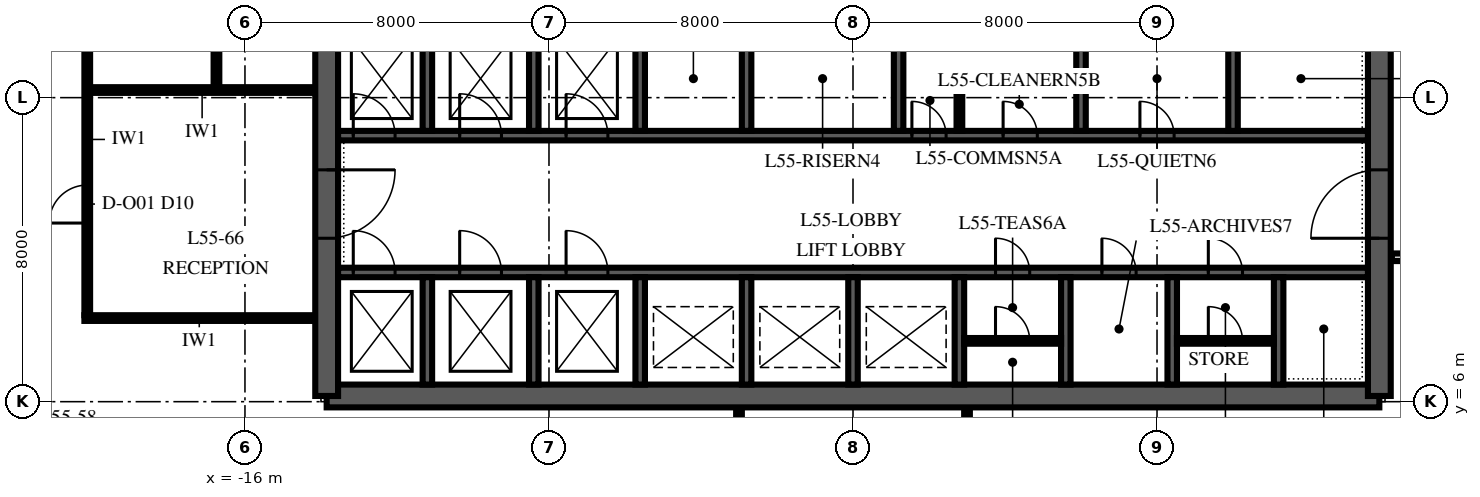
"""IFC4 building model, lengths in metres.
Left out: names, types, materials, properties, quantities, classifications, styles, units other than length and angle.
Written with IfcOpenShell. Run it as: python <this file> out.ifc"""

import sys

from ifc_helpers import new_model, si_unit, direction, frame, frame_2d, origin, place, context, subcontext, project, spatial, polyline, rectangle, outline, extrude, element, fill, save


model = new_model("IFC4")
c1 = context("Model", 3, precision=1e-05, world=origin(), true_north=direction((0.0, 1.0)))
c2 = subcontext(c1, "Body", "Model", "MODEL_VIEW")
j1 = project(units=[si_unit("LENGTHUNIT", "METRE"), si_unit("PLANEANGLEUNIT", "RADIAN")], contexts=[c1])
p1 = place(None, origin())
s1 = spatial("IfcSite", under=j1, at=p1, CompositionType="ELEMENT")
p2 = place(p1, origin())
s2 = spatial("IfcBuilding", under=s1, at=p2, CompositionType="ELEMENT")
p3 = place(p2, frame((0.0, 0.0, 238.0)))
s3 = spatial("IfcBuildingStorey", under=s2, at=p3, CompositionType="ELEMENT", Elevation=238.0)
p4 = place(p3, frame((-13.85, 6.15, 0.0), z_axis=(0.0, 0.0, 1.0), x_axis=(1.0, 0.0, 0.0)))
e1 = element("IfcWall", 1, at=p4, inside=s3, PredefinedType="SHEAR", context=c2, shape_type="SweptSolid", body=[
    extrude(rectangle(XDim=27.7, YDim=0.6, at=frame_2d((13.85, 0.0))), origin(), (0.0, 0.0, 1.0), 4.0),
])
p5 = place(p3, frame((13.85, 6.15, 0.0), z_axis=(0.0, 0.0, 1.0), x_axis=(0.0, 1.0, 0.0)))
e2 = element("IfcWall", 2, at=p5, inside=s3, PredefinedType="SHEAR", context=c2, shape_type="SweptSolid", body=[
    extrude(outline(polyline([(0.0, -0.3), (17.7, -0.3), (17.7, 0.0), (17.4, 0.0), (17.4, 0.3), (0.3, 0.3), (0.3, 0.0), (0.0, 0.0), (0.0, -0.3)])), origin(), (0.0, 0.0, 1.0), 4.0),
])
p6 = place(p5, frame((4.15, 0.0, 0.0)))
e3 = element("IfcOpeningElement", 3, at=p6, cuts=e2, PredefinedType="OPENING", context=c2, shape_type="SweptSolid", body=[
    extrude(rectangle(XDim=1.8, YDim=2.4, at=frame_2d((0.9, 1.2))), frame((0.0, 0.315, 0.0), z_axis=(0.0, -1.0, 0.0), x_axis=(1.0, 0.0, 0.0)), (0.0, 0.0, 1.0), 0.63),
])
p7 = place(p3, frame((-13.85, 23.85, 0.0), z_axis=(0.0, 0.0, 1.0), x_axis=(0.0, -1.0, 0.0)))
e4 = element("IfcWall", 4, at=p7, inside=s3, PredefinedType="SHEAR", context=c2, shape_type="SweptSolid", body=[
    extrude(outline(polyline([(0.0, -0.3), (17.7, -0.3), (17.7, 0.0), (17.4, 0.0), (17.4, 0.3), (0.3, 0.3), (0.3, 0.0), (0.0, 0.0), (0.0, -0.3)])), origin(), (0.0, 0.0, 1.0), 4.0),
])
p8 = place(p7, frame((11.75, 0.0, 0.0)))
e5 = element("IfcOpeningElement", 5, at=p8, cuts=e4, PredefinedType="OPENING", context=c2, shape_type="SweptSolid", body=[
    extrude(rectangle(XDim=1.8, YDim=2.4, at=frame_2d((0.9, 1.2))), frame((0.0, 0.315, 0.0), z_axis=(0.0, -1.0, 0.0), x_axis=(1.0, 0.0, 0.0)), (0.0, 0.0, 1.0), 0.63),
])
p9 = place(p3, frame((-13.55, 9.4, 0.0), z_axis=(0.0, 0.0, 1.0), x_axis=(1.0, 0.0, 0.0)))
e6 = element("IfcWall", 6, at=p9, inside=s3, PredefinedType="SHEAR", context=c2, shape_type="SweptSolid", body=[
    extrude(rectangle(XDim=27.1, YDim=0.25, at=frame_2d((13.55, 0.0))), origin(), (0.0, 0.0, 1.0), 4.0),
])
p10 = place(p9, frame((0.4, 0.0, 0.0)))
e7 = element("IfcOpeningElement", 7, at=p10, cuts=e6, PredefinedType="OPENING", context=c2, shape_type="SweptSolid", body=[
    extrude(rectangle(XDim=1.1, YDim=2.1, at=frame_2d((0.55, 1.05))), frame((0.0, 0.14, 0.0), z_axis=(0.0, -1.0, 0.0), x_axis=(1.0, 0.0, 0.0)), (0.0, 0.0, 1.0), 0.28),
])
p11 = place(p9, frame((3.2, 0.0, 0.0)))
e8 = element("IfcOpeningElement", 8, at=p11, cuts=e6, PredefinedType="OPENING", context=c2, shape_type="SweptSolid", body=[
    extrude(rectangle(XDim=1.1, YDim=2.1, at=frame_2d((0.55, 1.05))), frame((0.0, 0.14, 0.0), z_axis=(0.0, -1.0, 0.0), x_axis=(1.0, 0.0, 0.0)), (0.0, 0.0, 1.0), 0.28),
])
p12 = place(p9, frame((6.0, 0.0, 0.0)))
e9 = element("IfcOpeningElement", 9, at=p12, cuts=e6, PredefinedType="OPENING", context=c2, shape_type="SweptSolid", body=[
    extrude(rectangle(XDim=1.1, YDim=2.1, at=frame_2d((0.55, 1.05))), frame((0.0, 0.14, 0.0), z_axis=(0.0, -1.0, 0.0), x_axis=(1.0, 0.0, 0.0)), (0.0, 0.0, 1.0), 0.28),
])
p13 = place(p9, frame((17.3, 0.0, 0.0)))
e10 = element("IfcOpeningElement", 10, at=p13, cuts=e6, PredefinedType="OPENING", context=c2, shape_type="SweptSolid", body=[
    extrude(rectangle(XDim=0.9, YDim=2.1, at=frame_2d((0.45, 1.05))), frame((0.0, 0.14, 0.0), z_axis=(0.0, -1.0, 0.0), x_axis=(1.0, 0.0, 0.0)), (0.0, 0.0, 1.0), 0.28),
])
p14 = place(p9, frame((20.1, 0.0, 0.0)))
e11 = element("IfcOpeningElement", 11, at=p14, cuts=e6, PredefinedType="OPENING", context=c2, shape_type="SweptSolid", body=[
    extrude(rectangle(XDim=0.9, YDim=2.1, at=frame_2d((0.45, 1.05))), frame((0.0, 0.14, 0.0), z_axis=(0.0, -1.0, 0.0), x_axis=(1.0, 0.0, 0.0)), (0.0, 0.0, 1.0), 0.28),
])
p15 = place(p9, frame((22.9, 0.0, 0.0)))
e12 = element("IfcOpeningElement", 12, at=p15, cuts=e6, PredefinedType="OPENING", context=c2, shape_type="SweptSolid", body=[
    extrude(rectangle(XDim=0.9, YDim=2.1, at=frame_2d((0.45, 1.05))), frame((0.0, 0.14, 0.0), z_axis=(0.0, -1.0, 0.0), x_axis=(1.0, 0.0, 0.0)), (0.0, 0.0, 1.0), 0.28),
])
p16 = place(p3, frame((-13.55, 13.0, 0.0), z_axis=(0.0, 0.0, 1.0), x_axis=(1.0, 0.0, 0.0)))
e13 = element("IfcWall", 13, at=p16, inside=s3, PredefinedType="SHEAR", context=c2, shape_type="SweptSolid", body=[
    extrude(rectangle(XDim=27.1, YDim=0.25, at=frame_2d((13.55, 0.0))), origin(), (0.0, 0.0, 1.0), 4.0),
])
p17 = place(p16, frame((0.4, 0.0, 0.0)))
e14 = element("IfcOpeningElement", 14, at=p17, cuts=e13, PredefinedType="OPENING", context=c2, shape_type="SweptSolid", body=[
    extrude(rectangle(XDim=1.1, YDim=2.1, at=frame_2d((0.55, 1.05))), frame((0.0, 0.14, 0.0), z_axis=(0.0, -1.0, 0.0), x_axis=(1.0, 0.0, 0.0)), (0.0, 0.0, 1.0), 0.28),
])
p18 = place(p16, frame((3.2, 0.0, 0.0)))
e15 = element("IfcOpeningElement", 15, at=p18, cuts=e13, PredefinedType="OPENING", context=c2, shape_type="SweptSolid", body=[
    extrude(rectangle(XDim=1.1, YDim=2.1, at=frame_2d((0.55, 1.05))), frame((0.0, 0.14, 0.0), z_axis=(0.0, -1.0, 0.0), x_axis=(1.0, 0.0, 0.0)), (0.0, 0.0, 1.0), 0.28),
])
p19 = place(p16, frame((6.0, 0.0, 0.0)))
e16 = element("IfcOpeningElement", 16, at=p19, cuts=e13, PredefinedType="OPENING", context=c2, shape_type="SweptSolid", body=[
    extrude(rectangle(XDim=1.1, YDim=2.1, at=frame_2d((0.55, 1.05))), frame((0.0, 0.14, 0.0), z_axis=(0.0, -1.0, 0.0), x_axis=(1.0, 0.0, 0.0)), (0.0, 0.0, 1.0), 0.28),
])
p20 = place(p16, frame((15.1, 0.0, 0.0)))
e17 = element("IfcOpeningElement", 17, at=p20, cuts=e13, PredefinedType="OPENING", context=c2, shape_type="SweptSolid", body=[
    extrude(rectangle(XDim=0.9, YDim=2.1, at=frame_2d((0.45, 1.05))), frame((0.0, 0.14, 0.0), z_axis=(0.0, -1.0, 0.0), x_axis=(1.0, 0.0, 0.0)), (0.0, 0.0, 1.0), 0.28),
])
p21 = place(p16, frame((17.5, 0.0, 0.0)))
e18 = element("IfcOpeningElement", 18, at=p21, cuts=e13, PredefinedType="OPENING", context=c2, shape_type="SweptSolid", body=[
    extrude(rectangle(XDim=0.9, YDim=2.1, at=frame_2d((0.45, 1.05))), frame((0.0, 0.14, 0.0), z_axis=(0.0, -1.0, 0.0), x_axis=(1.0, 0.0, 0.0)), (0.0, 0.0, 1.0), 0.28),
])
p22 = place(p16, frame((21.1, 0.0, 0.0)))
e19 = element("IfcOpeningElement", 19, at=p22, cuts=e13, PredefinedType="OPENING", context=c2, shape_type="SweptSolid", body=[
    extrude(rectangle(XDim=0.9, YDim=2.1, at=frame_2d((0.45, 1.05))), frame((0.0, 0.14, 0.0), z_axis=(0.0, -1.0, 0.0), x_axis=(1.0, 0.0, 0.0)), (0.0, 0.0, 1.0), 0.28),
])
for number, where, z_axis, x_axis in (
    (20, (-11.2, 6.45, 0.0), (0.0, 0.0, 1.0), (0.0, 1.0, 0.0)),
    (21, (-8.4, 6.45, 0.0), (0.0, 0.0, 1.0), (0.0, 1.0, 0.0)),
    (22, (-5.6, 6.45, 0.0), (0.0, 0.0, 1.0), (0.0, 1.0, 0.0)),
    (23, (-2.8, 6.45, 0.0), (0.0, 0.0, 1.0), (0.0, 1.0, 0.0)),
    (24, (0.0, 6.45, 0.0), (0.0, 0.0, 1.0), (0.0, 1.0, 0.0)),
    (25, (2.8, 6.45, 0.0), (0.0, 0.0, 1.0), (0.0, 1.0, 0.0)),
    (26, (5.6, 6.45, 0.0), (0.0, 0.0, 1.0), (0.0, 1.0, 0.0)),
    (27, (8.4, 6.45, 0.0), (0.0, 0.0, 1.0), (0.0, 1.0, 0.0)),
    (28, (11.2, 6.45, 0.0), (0.0, 0.0, 1.0), (0.0, 1.0, 0.0)),
):
    element("IfcWall", number, at=place(p3, frame(where, z_axis=z_axis, x_axis=x_axis)), inside=s3, PredefinedType="SHEAR", context=c2, shape_type="SweptSolid", body=[
        extrude(rectangle(XDim=2.825, YDim=0.25, at=frame_2d((1.413, 0.0))), origin(), (0.0, 0.0, 1.0), 4.0),
    ])
for number, where, z_axis, x_axis in (
    (29, (-11.2, 13.125, 0.0), (0.0, 0.0, 1.0), (0.0, 1.0, 0.0)),
    (30, (-8.4, 13.125, 0.0), (0.0, 0.0, 1.0), (0.0, 1.0, 0.0)),
    (31, (-5.6, 13.125, 0.0), (0.0, 0.0, 1.0), (0.0, 1.0, 0.0)),
    (32, (-2.8, 13.125, 0.0), (0.0, 0.0, 1.0), (0.0, 1.0, 0.0)),
    (33, (1.2, 13.125, 0.0), (0.0, 0.0, 1.0), (0.0, 1.0, 0.0)),
    (34, (6.0, 13.125, 0.0), (0.0, 0.0, 1.0), (0.0, 1.0, 0.0)),
    (35, (10.0, 13.125, 0.0), (0.0, 0.0, 1.0), (0.0, 1.0, 0.0)),
):
    element("IfcWall", number, at=place(p3, frame(where, z_axis=z_axis, x_axis=x_axis)), inside=s3, PredefinedType="SHEAR", context=c2, shape_type="SweptSolid", body=[
        extrude(rectangle(XDim=2.75, YDim=0.25, at=frame_2d((1.375, 0.0))), origin(), (0.0, 0.0, 1.0), 4.0),
    ])
p23 = place(p3, frame((2.8, 13.125, 0.0), z_axis=(0.0, 0.0, 1.0), x_axis=(0.0, 1.0, 0.0)))
e36 = element("IfcWall", 36, at=p23, inside=s3, PredefinedType="PARTITIONING", context=c2, shape_type="SweptSolid", body=[
    extrude(rectangle(XDim=1.55, YDim=0.15, at=frame_2d((0.775, 0.0))), origin(), (0.0, 0.0, 1.0), 3.85),
])
p24 = place(p3, frame((2.875, 14.6, 0.0), z_axis=(0.0, 0.0, 1.0), x_axis=(1.0, 0.0, 0.0)))
e37 = element("IfcWall", 37, at=p24, inside=s3, PredefinedType="PARTITIONING", context=c2, shape_type="SweptSolid", body=[
    extrude(rectangle(XDim=3.0, YDim=0.15, at=frame_2d((1.5, 0.0))), origin(), (0.0, 0.0, 1.0), 3.85),
])
p25 = place(p3, frame((2.925, 7.6, 0.0), z_axis=(0.0, 0.0, 1.0), x_axis=(1.0, 0.0, 0.0)))
e38 = element("IfcWall", 38, at=p25, inside=s3, PredefinedType="PARTITIONING", context=c2, shape_type="SweptSolid", body=[
    extrude(rectangle(XDim=2.55, YDim=0.15, at=frame_2d((1.275, 0.0))), origin(), (0.0, 0.0, 1.0), 3.85),
])
p26 = place(p25, frame((0.825, 0.0, 0.0)))
e39 = element("IfcOpeningElement", 39, at=p26, cuts=e38, PredefinedType="OPENING", context=c2, shape_type="SweptSolid", body=[
    extrude(rectangle(XDim=0.9, YDim=2.1, at=frame_2d((0.45, 1.05))), frame((0.0, 0.09, 0.0), z_axis=(0.0, -1.0, 0.0), x_axis=(1.0, 0.0, 0.0)), (0.0, 0.0, 1.0), 0.18),
])
p27 = place(p3, frame((8.525, 7.6, 0.0), z_axis=(0.0, 0.0, 1.0), x_axis=(1.0, 0.0, 0.0)))
e40 = element("IfcWall", 40, at=p27, inside=s3, PredefinedType="PARTITIONING", context=c2, shape_type="SweptSolid", body=[
    extrude(rectangle(XDim=2.55, YDim=0.15, at=frame_2d((1.275, 0.0))), origin(), (0.0, 0.0, 1.0), 3.85),
])
p28 = place(p27, frame((0.825, 0.0, 0.0)))
e41 = element("IfcOpeningElement", 41, at=p28, cuts=e40, PredefinedType="OPENING", context=c2, shape_type="SweptSolid", body=[
    extrude(rectangle(XDim=0.9, YDim=2.1, at=frame_2d((0.45, 1.05))), frame((0.0, 0.09, 0.0), z_axis=(0.0, -1.0, 0.0), x_axis=(1.0, 0.0, 0.0)), (0.0, 0.0, 1.0), 0.18),
])
p29 = place(p3, frame((-20.225, 8.2, 0.0), z_axis=(0.0, 0.0, 1.0), x_axis=(1.0, 0.0, 0.0)))
e42 = element("IfcWall", 42, at=p29, inside=s3, PredefinedType="PARTITIONING", context=c2, shape_type="SweptSolid", body=[
    extrude(rectangle(XDim=6.045, YDim=0.15, at=frame_2d((3.022, 0.0))), origin(), (0.0, 0.0, 1.0), 3.75),
])
p30 = place(p3, frame((14.18, 9.8, 0.0), z_axis=(0.0, 0.0, 1.0), x_axis=(1.0, 0.0, 0.0)))
e43 = element("IfcWall", 43, at=p30, inside=s3, PredefinedType="PARTITIONING", context=c2, shape_type="SweptSolid", body=[
    extrude(rectangle(XDim=2.02, YDim=0.2, at=frame_2d((1.01, 0.0))), origin(), (0.0, 0.0, 1.0), 3.75),
])
p31 = place(p3, frame((-20.075, 14.2, 0.0), z_axis=(0.0, 0.0, 1.0), x_axis=(1.0, 0.0, 0.0)))
e44 = element("IfcWall", 44, at=p31, inside=s3, PredefinedType="PARTITIONING", context=c2, shape_type="SweptSolid", body=[
    extrude(rectangle(XDim=5.895, YDim=0.15, at=frame_2d((2.948, 0.0))), origin(), (0.0, 0.0, 1.0), 3.13),
])
p32 = place(p3, frame((-20.15, 8.275, 0.0), z_axis=(0.0, 0.0, 1.0), x_axis=(0.0, 1.0, 0.0)))
e45 = element("IfcWall", 45, at=p32, inside=s3, PredefinedType="PARTITIONING", context=c2, shape_type="SweptSolid", body=[
    extrude(rectangle(XDim=9.25, YDim=0.15, at=frame_2d((4.625, 0.0))), origin(), (0.0, 0.0, 1.0), 3.13),
])
p33 = place(p32, frame((2.425, 0.0, 0.0)))
e46 = element("IfcOpeningElement", 46, at=p33, cuts=e45, PredefinedType="OPENING", context=c2, shape_type="SweptSolid", body=[
    extrude(rectangle(XDim=1.0, YDim=2.3, at=frame_2d((0.5, 1.15))), frame((0.0, 0.09, 0.0), z_axis=(0.0, -1.0, 0.0), x_axis=(1.0, 0.0, 0.0)), (0.0, 0.0, 1.0), 0.18),
])
p34 = place(p32, frame((7.125, 0.0, 0.0)))
e47 = element("IfcOpeningElement", 47, at=p34, cuts=e45, PredefinedType="OPENING", context=c2, shape_type="SweptSolid", body=[
    extrude(rectangle(XDim=1.0, YDim=2.3, at=frame_2d((0.5, 1.15))), frame((0.0, 0.09, 0.0), z_axis=(0.0, -1.0, 0.0), x_axis=(1.0, 0.0, 0.0)), (0.0, 0.0, 1.0), 0.18),
])
p35 = place(p3, frame((-16.75, 14.275, 0.0), z_axis=(0.0, 0.0, 1.0), x_axis=(0.0, 1.0, 0.0)))
e48 = element("IfcWall", 48, at=p35, inside=s3, PredefinedType="PARTITIONING", context=c2, shape_type="SweptSolid", body=[
    extrude(rectangle(XDim=3.25, YDim=0.15, at=frame_2d((1.625, 0.0))), origin(), (0.0, 0.0, 1.0), 3.13),
])
for number, where, z_axis, x_axis in (
    (49, (-3.0, 1.675, 0.0), (0.0, 0.0, 1.0), (0.0, 1.0, 0.0)),
    (50, (3.0, 1.675, 0.0), (0.0, 0.0, 1.0), (0.0, 1.0, 0.0)),
):
    element("IfcWall", number, at=place(p3, frame(where, z_axis=z_axis, x_axis=x_axis)), inside=s3, PredefinedType="PARTITIONING", context=c2, shape_type="SweptSolid", body=[
        extrude(rectangle(XDim=4.145, YDim=0.15, at=frame_2d((2.073, 0.0))), origin(), (0.0, 0.0, 1.0), 3.75),
    ])
p36 = place(p6, origin())
e51 = element("IfcDoor", 51, at=p36, inside=s3, OperationType="DOUBLE_DOOR_SINGLE_SWING", PredefinedType="DOOR", context=c2, shape_type="SweptSolid", body=[
    extrude(rectangle(XDim=1.8, YDim=2.4, at=frame_2d((0.9, 1.2))), frame((0.0, 0.3, 0.0), z_axis=(0.0, -1.0, 0.0), x_axis=(1.0, 0.0, 0.0)), (0.0, 0.0, 1.0), 0.6),
])
fill(e3, e51)
p37 = place(p8, origin())
e52 = element("IfcDoor", 52, at=p37, inside=s3, OperationType="DOUBLE_DOOR_SINGLE_SWING", PredefinedType="DOOR", context=c2, shape_type="SweptSolid", body=[
    extrude(rectangle(XDim=1.8, YDim=2.4, at=frame_2d((0.9, 1.2))), frame((0.0, 0.3, 0.0), z_axis=(0.0, -1.0, 0.0), x_axis=(1.0, 0.0, 0.0)), (0.0, 0.0, 1.0), 0.6),
])
fill(e5, e52)
p38 = place(p10, origin())
e53 = element("IfcDoor", 53, at=p38, inside=s3, OperationType="SLIDING_TO_LEFT", PredefinedType="DOOR", context=c2, shape_type="SweptSolid", body=[
    extrude(rectangle(XDim=1.1, YDim=2.1, at=frame_2d((0.55, 1.05))), frame((0.0, 0.125, 0.0), z_axis=(0.0, -1.0, 0.0), x_axis=(1.0, 0.0, 0.0)), (0.0, 0.0, 1.0), 0.25),
])
fill(e7, e53)
p39 = place(p11, origin())
e54 = element("IfcDoor", 54, at=p39, inside=s3, OperationType="SLIDING_TO_LEFT", PredefinedType="DOOR", context=c2, shape_type="SweptSolid", body=[
    extrude(rectangle(XDim=1.1, YDim=2.1, at=frame_2d((0.55, 1.05))), frame((0.0, 0.125, 0.0), z_axis=(0.0, -1.0, 0.0), x_axis=(1.0, 0.0, 0.0)), (0.0, 0.0, 1.0), 0.25),
])
fill(e8, e54)
p40 = place(p12, origin())
e55 = element("IfcDoor", 55, at=p40, inside=s3, OperationType="SLIDING_TO_LEFT", PredefinedType="DOOR", context=c2, shape_type="SweptSolid", body=[
    extrude(rectangle(XDim=1.1, YDim=2.1, at=frame_2d((0.55, 1.05))), frame((0.0, 0.125, 0.0), z_axis=(0.0, -1.0, 0.0), x_axis=(1.0, 0.0, 0.0)), (0.0, 0.0, 1.0), 0.25),
])
fill(e9, e55)
p41 = place(p17, origin())
e56 = element("IfcDoor", 56, at=p41, inside=s3, OperationType="SLIDING_TO_LEFT", PredefinedType="DOOR", context=c2, shape_type="SweptSolid", body=[
    extrude(rectangle(XDim=1.1, YDim=2.1, at=frame_2d((0.55, 1.05))), frame((0.0, 0.125, 0.0), z_axis=(0.0, -1.0, 0.0), x_axis=(1.0, 0.0, 0.0)), (0.0, 0.0, 1.0), 0.25),
])
fill(e14, e56)
p42 = place(p18, origin())
e57 = element("IfcDoor", 57, at=p42, inside=s3, OperationType="SLIDING_TO_LEFT", PredefinedType="DOOR", context=c2, shape_type="SweptSolid", body=[
    extrude(rectangle(XDim=1.1, YDim=2.1, at=frame_2d((0.55, 1.05))), frame((0.0, 0.125, 0.0), z_axis=(0.0, -1.0, 0.0), x_axis=(1.0, 0.0, 0.0)), (0.0, 0.0, 1.0), 0.25),
])
fill(e15, e57)
p43 = place(p19, origin())
e58 = element("IfcDoor", 58, at=p43, inside=s3, OperationType="SLIDING_TO_LEFT", PredefinedType="DOOR", context=c2, shape_type="SweptSolid", body=[
    extrude(rectangle(XDim=1.1, YDim=2.1, at=frame_2d((0.55, 1.05))), frame((0.0, 0.125, 0.0), z_axis=(0.0, -1.0, 0.0), x_axis=(1.0, 0.0, 0.0)), (0.0, 0.0, 1.0), 0.25),
])
fill(e16, e58)
p44 = place(p20, origin())
e59 = element("IfcDoor", 59, at=p44, inside=s3, OperationType="SINGLE_SWING_LEFT", PredefinedType="DOOR", context=c2, shape_type="SweptSolid", body=[
    extrude(rectangle(XDim=0.9, YDim=2.1, at=frame_2d((0.45, 1.05))), frame((0.0, 0.125, 0.0), z_axis=(0.0, -1.0, 0.0), x_axis=(1.0, 0.0, 0.0)), (0.0, 0.0, 1.0), 0.25),
])
fill(e17, e59)
p45 = place(p21, origin())
e60 = element("IfcDoor", 60, at=p45, inside=s3, OperationType="SINGLE_SWING_LEFT", PredefinedType="DOOR", context=c2, shape_type="SweptSolid", body=[
    extrude(rectangle(XDim=0.9, YDim=2.1, at=frame_2d((0.45, 1.05))), frame((0.0, 0.125, 0.0), z_axis=(0.0, -1.0, 0.0), x_axis=(1.0, 0.0, 0.0)), (0.0, 0.0, 1.0), 0.25),
])
fill(e18, e60)
p46 = place(p22, origin())
e61 = element("IfcDoor", 61, at=p46, inside=s3, OperationType="SINGLE_SWING_LEFT", PredefinedType="DOOR", context=c2, shape_type="SweptSolid", body=[
    extrude(rectangle(XDim=0.9, YDim=2.1, at=frame_2d((0.45, 1.05))), frame((0.0, 0.125, 0.0), z_axis=(0.0, -1.0, 0.0), x_axis=(1.0, 0.0, 0.0)), (0.0, 0.0, 1.0), 0.25),
])
fill(e19, e61)
p47 = place(p13, origin())
e62 = element("IfcDoor", 62, at=p47, inside=s3, OperationType="SINGLE_SWING_LEFT", PredefinedType="DOOR", context=c2, shape_type="SweptSolid", body=[
    extrude(rectangle(XDim=0.9, YDim=2.1, at=frame_2d((0.45, 1.05))), frame((0.0, 0.125, 0.0), z_axis=(0.0, -1.0, 0.0), x_axis=(1.0, 0.0, 0.0)), (0.0, 0.0, 1.0), 0.25),
])
fill(e10, e62)
p48 = place(p26, origin())
e63 = element("IfcDoor", 63, at=p48, inside=s3, OperationType="SINGLE_SWING_LEFT", PredefinedType="DOOR", context=c2, shape_type="SweptSolid", body=[
    extrude(rectangle(XDim=0.9, YDim=2.1, at=frame_2d((0.45, 1.05))), frame((0.0, 0.075, 0.0), z_axis=(0.0, -1.0, 0.0), x_axis=(1.0, 0.0, 0.0)), (0.0, 0.0, 1.0), 0.149),
])
fill(e39, e63)
p49 = place(p14, origin())
e64 = element("IfcDoor", 64, at=p49, inside=s3, OperationType="SINGLE_SWING_LEFT", PredefinedType="DOOR", context=c2, shape_type="SweptSolid", body=[
    extrude(rectangle(XDim=0.9, YDim=2.1, at=frame_2d((0.45, 1.05))), frame((0.0, 0.125, 0.0), z_axis=(0.0, -1.0, 0.0), x_axis=(1.0, 0.0, 0.0)), (0.0, 0.0, 1.0), 0.25),
])
fill(e11, e64)
p50 = place(p15, origin())
e65 = element("IfcDoor", 65, at=p50, inside=s3, OperationType="SINGLE_SWING_LEFT", PredefinedType="DOOR", context=c2, shape_type="SweptSolid", body=[
    extrude(rectangle(XDim=0.9, YDim=2.1, at=frame_2d((0.45, 1.05))), frame((0.0, 0.125, 0.0), z_axis=(0.0, -1.0, 0.0), x_axis=(1.0, 0.0, 0.0)), (0.0, 0.0, 1.0), 0.25),
])
fill(e12, e65)
p51 = place(p28, origin())
e66 = element("IfcDoor", 66, at=p51, inside=s3, OperationType="SINGLE_SWING_LEFT", PredefinedType="DOOR", context=c2, shape_type="SweptSolid", body=[
    extrude(rectangle(XDim=0.9, YDim=2.1, at=frame_2d((0.45, 1.05))), frame((0.0, 0.075, 0.0), z_axis=(0.0, -1.0, 0.0), x_axis=(1.0, 0.0, 0.0)), (0.0, 0.0, 1.0), 0.149),
])
fill(e41, e66)
p52 = place(p33, origin())
e67 = element("IfcDoor", 67, at=p52, inside=s3, OperationType="SINGLE_SWING_LEFT", PredefinedType="DOOR", context=c2, shape_type="SweptSolid", body=[
    extrude(rectangle(XDim=1.0, YDim=2.3, at=frame_2d((0.5, 1.15))), frame((0.0, 0.075, 0.0), z_axis=(0.0, -1.0, 0.0), x_axis=(1.0, 0.0, 0.0)), (0.0, 0.0, 1.0), 0.149),
])
fill(e46, e67)
save(model, sys.argv[1])
